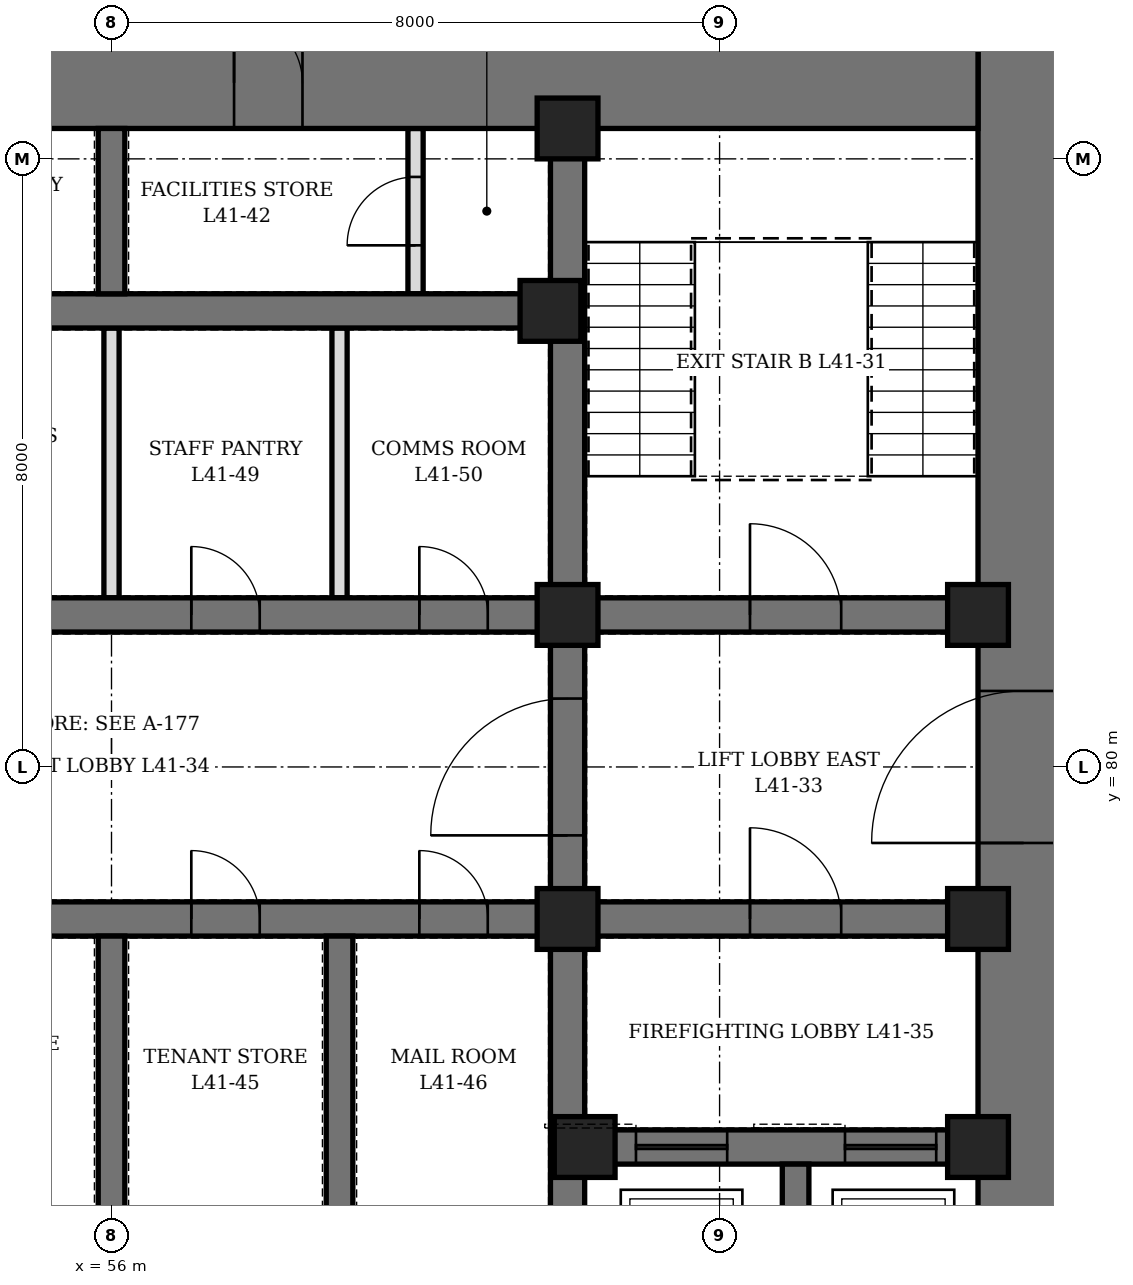
"""IFC4 building model, lengths in metres.
Left out: names, types, materials, properties, quantities, classifications, styles, units other than length and angle.
Written with IfcOpenShell. Run it as: python <this file> out.ifc"""

import sys

from ifc_helpers import new_model, si_unit, direction, frame, frame_2d, origin, origin_2d, place, context, subcontext, project, spatial, rectangle, hollow_rectangle, extrude, element, fill, save


model = new_model("IFC4")
c1 = context("Model", 3, precision=1e-05, world=origin(), true_north=direction((0.0, 1.0)))
c2 = subcontext(c1, "Body", "Model", "MODEL_VIEW")
j1 = project(units=[si_unit("LENGTHUNIT", "METRE"), si_unit("PLANEANGLEUNIT", "RADIAN")], contexts=[c1])
p1 = place(None, origin())
s1 = spatial("IfcSite", under=j1, at=p1, CompositionType="ELEMENT")
p2 = place(p1, origin())
s2 = spatial("IfcBuilding", under=s1, at=p2, CompositionType="ELEMENT")
p3 = place(p2, frame((0.0, 0.0, 185.5)))
s3 = spatial("IfcBuildingStorey", under=s2, at=p3, CompositionType="ELEMENT", Elevation=185.5)
p4 = place(p3, frame((68.0, 70.4, 0.0), z_axis=(0.0, 0.0, 1.0), x_axis=(0.0, 1.0, 0.0)))
e1 = element("IfcWall", 1, at=p4, inside=s3, PredefinedType="SHEAR", context=c2, shape_type="SweptSolid", body=[
    extrude(rectangle(XDim=19.2, YDim=1.2, at=frame_2d((9.6, 0.0))), origin(), (0.0, 0.0, 1.0), 4.2),
])
p5 = place(p4, frame((8.6, 0.0, 0.0)))
e2 = element("IfcOpeningElement", 2, at=p5, cuts=e1, PredefinedType="OPENING", context=c2, shape_type="SweptSolid", body=[
    extrude(rectangle(XDim=2.0, YDim=2.4, at=frame_2d((1.0, 1.2))), frame((0.0, 0.61, 0.0), z_axis=(0.0, -1.0, 0.0), x_axis=(1.0, 0.0, 0.0)), (0.0, 0.0, 1.0), 1.22),
])
p6 = place(p3, frame((44.6, 89.0, 0.0), z_axis=(0.0, 0.0, 1.0), x_axis=(1.0, 0.0, 0.0)))
e3 = element("IfcWall", 3, at=p6, inside=s3, PredefinedType="SHEAR", context=c2, shape_type="SweptSolid", body=[
    extrude(rectangle(XDim=22.8, YDim=1.2, at=frame_2d((11.4, 0.0))), origin(), (0.0, 0.0, 1.0), 4.2),
])
p7 = place(p6, frame((6.525, 0.0, 0.0)))
e4 = element("IfcOpeningElement", 4, at=p7, cuts=e3, PredefinedType="OPENING", context=c2, shape_type="SweptSolid", body=[
    extrude(rectangle(XDim=1.0, YDim=2.1, at=frame_2d((0.5, 1.05))), frame((0.0, 0.61, 0.0), z_axis=(0.0, -1.0, 0.0), x_axis=(1.0, 0.0, 0.0)), (0.0, 0.0, 1.0), 1.22),
])
p8 = place(p6, frame((9.45, 0.0, 0.0)))
e5 = element("IfcOpeningElement", 5, at=p8, cuts=e3, PredefinedType="OPENING", context=c2, shape_type="SweptSolid", body=[
    extrude(rectangle(XDim=0.9, YDim=2.1, at=frame_2d((0.45, 1.05))), frame((0.0, 0.61, 0.0), z_axis=(0.0, -1.0, 0.0), x_axis=(1.0, 0.0, 0.0)), (0.0, 0.0, 1.0), 1.22),
])
p9 = place(p6, frame((13.012, 0.0, 0.0)))
e6 = element("IfcOpeningElement", 6, at=p9, cuts=e3, PredefinedType="OPENING", context=c2, shape_type="SweptSolid", body=[
    extrude(rectangle(XDim=0.9, YDim=2.1, at=frame_2d((0.45, 1.05))), frame((0.0, 0.61, 0.0), z_axis=(0.0, -1.0, 0.0), x_axis=(1.0, 0.0, 0.0)), (0.0, 0.0, 1.0), 1.22),
])
p10 = place(p3, frame((62.0, 71.6, 0.0), z_axis=(0.0, 0.0, 1.0), x_axis=(0.0, 1.0, 0.0)))
e7 = element("IfcWall", 7, at=p10, inside=s3, PredefinedType="SHEAR", context=c2, shape_type="SweptSolid", body=[
    extrude(rectangle(XDim=16.8, YDim=0.45, at=frame_2d((8.4, 0.0))), origin(), (0.0, 0.0, 1.0), 4.2),
])
p11 = place(p10, frame((7.5, 0.0, 0.0)))
e8 = element("IfcOpeningElement", 8, at=p11, cuts=e7, PredefinedType="OPENING", context=c2, shape_type="SweptSolid", body=[
    extrude(rectangle(XDim=1.8, YDim=2.4, at=frame_2d((0.9, 1.2))), frame((0.0, 0.235, 0.0), z_axis=(0.0, -1.0, 0.0), x_axis=(1.0, 0.0, 0.0)), (0.0, 0.0, 1.0), 0.47),
])
p12 = place(p3, frame((62.225, 75.0, 0.0), z_axis=(0.0, 0.0, 1.0), x_axis=(1.0, 0.0, 0.0)))
e9 = element("IfcWall", 9, at=p12, inside=s3, PredefinedType="SHEAR", context=c2, shape_type="SweptSolid", body=[
    extrude(rectangle(XDim=5.175, YDim=0.45, at=frame_2d((2.587, 0.0))), origin(), (0.0, 0.0, 1.0), 4.2),
])
p13 = place(p12, frame((0.675, 0.0, 0.0)))
e10 = element("IfcOpeningElement", 10, at=p13, cuts=e9, PredefinedType="OPENING", context=c2, shape_type="SweptSolid", body=[
    extrude(rectangle(XDim=1.2, YDim=2.2, at=frame_2d((0.6, 1.1))), frame((0.0, 0.235, 0.0), z_axis=(0.0, -1.0, 0.0), x_axis=(1.0, 0.0, 0.0)), (0.0, 0.0, 1.0), 0.47),
])
p14 = place(p12, frame((3.425, 0.0, 0.0)))
e11 = element("IfcOpeningElement", 11, at=p14, cuts=e9, PredefinedType="OPENING", context=c2, shape_type="SweptSolid", body=[
    extrude(rectangle(XDim=1.2, YDim=2.2, at=frame_2d((0.6, 1.1))), frame((0.0, 0.235, 0.0), z_axis=(0.0, -1.0, 0.0), x_axis=(1.0, 0.0, 0.0)), (0.0, 0.0, 1.0), 0.47),
])
p15 = place(p3, frame((62.225, 78.0, 0.0), z_axis=(0.0, 0.0, 1.0), x_axis=(1.0, 0.0, 0.0)))
e12 = element("IfcWall", 12, at=p15, inside=s3, PredefinedType="SHEAR", context=c2, shape_type="SweptSolid", body=[
    extrude(rectangle(XDim=5.175, YDim=0.45, at=frame_2d((2.587, 0.0))), origin(), (0.0, 0.0, 1.0), 4.2),
])
p16 = place(p15, frame((2.175, 0.0, 0.0)))
e13 = element("IfcOpeningElement", 13, at=p16, cuts=e12, PredefinedType="OPENING", context=c2, shape_type="SweptSolid", body=[
    extrude(rectangle(XDim=1.2, YDim=2.1, at=frame_2d((0.6, 1.05))), frame((0.0, 0.235, 0.0), z_axis=(0.0, -1.0, 0.0), x_axis=(1.0, 0.0, 0.0)), (0.0, 0.0, 1.0), 0.47),
])
p17 = place(p3, frame((62.225, 82.0, 0.0), z_axis=(0.0, 0.0, 1.0), x_axis=(1.0, 0.0, 0.0)))
e14 = element("IfcWall", 14, at=p17, inside=s3, PredefinedType="SHEAR", context=c2, shape_type="SweptSolid", body=[
    extrude(rectangle(XDim=5.175, YDim=0.45, at=frame_2d((2.587, 0.0))), origin(), (0.0, 0.0, 1.0), 4.2),
])
p18 = place(p17, frame((2.175, 0.0, 0.0)))
e15 = element("IfcOpeningElement", 15, at=p18, cuts=e14, PredefinedType="OPENING", context=c2, shape_type="SweptSolid", body=[
    extrude(rectangle(XDim=1.2, YDim=2.1, at=frame_2d((0.6, 1.05))), frame((0.0, 0.235, 0.0), z_axis=(0.0, -1.0, 0.0), x_axis=(1.0, 0.0, 0.0)), (0.0, 0.0, 1.0), 0.47),
])
p19 = place(p3, frame((50.225, 78.0, 0.0), z_axis=(0.0, 0.0, 1.0), x_axis=(1.0, 0.0, 0.0)))
e16 = element("IfcWall", 16, at=p19, inside=s3, PredefinedType="SHEAR", context=c2, shape_type="SweptSolid", body=[
    extrude(rectangle(XDim=11.55, YDim=0.45, at=frame_2d((5.775, 0.0))), origin(), (0.0, 0.0, 1.0), 4.2),
])
p20 = place(p19, frame((0.825, 0.0, 0.0)))
e17 = element("IfcOpeningElement", 17, at=p20, cuts=e16, PredefinedType="OPENING", context=c2, shape_type="SweptSolid", body=[
    extrude(rectangle(XDim=0.9, YDim=2.1, at=frame_2d((0.45, 1.05))), frame((0.0, 0.235, 0.0), z_axis=(0.0, -1.0, 0.0), x_axis=(1.0, 0.0, 0.0)), (0.0, 0.0, 1.0), 0.47),
])
p21 = place(p19, frame((3.825, 0.0, 0.0)))
e18 = element("IfcOpeningElement", 18, at=p21, cuts=e16, PredefinedType="OPENING", context=c2, shape_type="SweptSolid", body=[
    extrude(rectangle(XDim=0.9, YDim=2.1, at=frame_2d((0.45, 1.05))), frame((0.0, 0.235, 0.0), z_axis=(0.0, -1.0, 0.0), x_axis=(1.0, 0.0, 0.0)), (0.0, 0.0, 1.0), 0.47),
])
p22 = place(p19, frame((6.825, 0.0, 0.0)))
e19 = element("IfcOpeningElement", 19, at=p22, cuts=e16, PredefinedType="OPENING", context=c2, shape_type="SweptSolid", body=[
    extrude(rectangle(XDim=0.9, YDim=2.1, at=frame_2d((0.45, 1.05))), frame((0.0, 0.235, 0.0), z_axis=(0.0, -1.0, 0.0), x_axis=(1.0, 0.0, 0.0)), (0.0, 0.0, 1.0), 0.47),
])
p23 = place(p19, frame((9.825, 0.0, 0.0)))
e20 = element("IfcOpeningElement", 20, at=p23, cuts=e16, PredefinedType="OPENING", context=c2, shape_type="SweptSolid", body=[
    extrude(rectangle(XDim=0.9, YDim=2.1, at=frame_2d((0.45, 1.05))), frame((0.0, 0.235, 0.0), z_axis=(0.0, -1.0, 0.0), x_axis=(1.0, 0.0, 0.0)), (0.0, 0.0, 1.0), 0.47),
])
p24 = place(p3, frame((50.225, 82.0, 0.0), z_axis=(0.0, 0.0, 1.0), x_axis=(1.0, 0.0, 0.0)))
e21 = element("IfcWall", 21, at=p24, inside=s3, PredefinedType="SHEAR", context=c2, shape_type="SweptSolid", body=[
    extrude(rectangle(XDim=11.55, YDim=0.45, at=frame_2d((5.775, 0.0))), origin(), (0.0, 0.0, 1.0), 4.2),
])
p25 = place(p24, frame((0.825, 0.0, 0.0)))
e22 = element("IfcOpeningElement", 22, at=p25, cuts=e21, PredefinedType="OPENING", context=c2, shape_type="SweptSolid", body=[
    extrude(rectangle(XDim=0.9, YDim=2.1, at=frame_2d((0.45, 1.05))), frame((0.0, 0.235, 0.0), z_axis=(0.0, -1.0, 0.0), x_axis=(1.0, 0.0, 0.0)), (0.0, 0.0, 1.0), 0.47),
])
p26 = place(p24, frame((3.825, 0.0, 0.0)))
e23 = element("IfcOpeningElement", 23, at=p26, cuts=e21, PredefinedType="OPENING", context=c2, shape_type="SweptSolid", body=[
    extrude(rectangle(XDim=0.9, YDim=2.1, at=frame_2d((0.45, 1.05))), frame((0.0, 0.235, 0.0), z_axis=(0.0, -1.0, 0.0), x_axis=(1.0, 0.0, 0.0)), (0.0, 0.0, 1.0), 0.47),
])
p27 = place(p24, frame((6.825, 0.0, 0.0)))
e24 = element("IfcOpeningElement", 24, at=p27, cuts=e21, PredefinedType="OPENING", context=c2, shape_type="SweptSolid", body=[
    extrude(rectangle(XDim=0.9, YDim=2.1, at=frame_2d((0.45, 1.05))), frame((0.0, 0.235, 0.0), z_axis=(0.0, -1.0, 0.0), x_axis=(1.0, 0.0, 0.0)), (0.0, 0.0, 1.0), 0.47),
])
p28 = place(p24, frame((9.825, 0.0, 0.0)))
e25 = element("IfcOpeningElement", 25, at=p28, cuts=e21, PredefinedType="OPENING", context=c2, shape_type="SweptSolid", body=[
    extrude(rectangle(XDim=0.9, YDim=2.1, at=frame_2d((0.45, 1.05))), frame((0.0, 0.235, 0.0), z_axis=(0.0, -1.0, 0.0), x_axis=(1.0, 0.0, 0.0)), (0.0, 0.0, 1.0), 0.47),
])
p29 = place(p3, frame((50.225, 86.0, 0.0), z_axis=(0.0, 0.0, 1.0), x_axis=(1.0, 0.0, 0.0)))
e26 = element("IfcWall", 26, at=p29, inside=s3, PredefinedType="SHEAR", context=c2, shape_type="SweptSolid", body=[
    extrude(rectangle(XDim=11.55, YDim=0.45, at=frame_2d((5.775, 0.0))), origin(), (0.0, 0.0, 1.0), 4.2),
])
for number, where, z_axis, x_axis in (
    (27, (56.0, 74.175, 0.0), (0.0, 0.0, 1.0), (0.0, 1.0, 0.0)),
    (28, (59.0, 74.175, 0.0), (0.0, 0.0, 1.0), (0.0, 1.0, 0.0)),
):
    element("IfcWall", number, at=place(p3, frame(where, z_axis=z_axis, x_axis=x_axis)), inside=s3, PredefinedType="SHEAR", context=c2, shape_type="SweptSolid", body=[
        extrude(rectangle(XDim=3.6, YDim=0.35, at=frame_2d((1.8, 0.0))), origin(), (0.0, 0.0, 1.0), 4.2),
    ])
p30 = place(p3, frame((65.0, 71.6, 0.0), z_axis=(0.0, 0.0, 1.0), x_axis=(0.0, 1.0, 0.0)))
e29 = element("IfcWall", 29, at=p30, inside=s3, PredefinedType="SHEAR", context=c2, shape_type="SweptSolid", body=[
    extrude(rectangle(XDim=3.175, YDim=0.35, at=frame_2d((1.587, 0.0))), origin(), (0.0, 0.0, 1.0), 4.2),
])
p31 = place(p3, frame((56.0, 86.225, 0.0), z_axis=(0.0, 0.0, 1.0), x_axis=(0.0, 1.0, 0.0)))
e30 = element("IfcWall", 30, at=p31, inside=s3, PredefinedType="SHEAR", context=c2, shape_type="SweptSolid", body=[
    extrude(rectangle(XDim=2.175, YDim=0.35, at=frame_2d((1.087, 0.0))), origin(), (0.0, 0.0, 1.0), 4.2),
])
for number, where, z_axis, x_axis in (
    (31, (61.775, 86.0, 0.0), (0.0, 0.0, 1.0), (1.0, 0.0, 0.0)),
    (32, (62.0, 78.0, 0.0), (0.0, 0.0, 1.0), (1.0, 0.0, 0.0)),
    (33, (62.0, 82.0, 0.0), (0.0, 0.0, 1.0), (1.0, 0.0, 0.0)),
    (34, (62.0, 88.4, 0.0), (0.0, 0.0, 1.0), (1.0, 0.0, 0.0)),
    (35, (62.225, 75.0, 0.0), (0.0, 0.0, 1.0), (1.0, 0.0, 0.0)),
    (36, (67.4, 75.0, 0.0), (0.0, 0.0, 1.0), (1.0, 0.0, 0.0)),
    (37, (67.4, 78.0, 0.0), (0.0, 0.0, 1.0), (1.0, 0.0, 0.0)),
    (38, (67.4, 82.0, 0.0), (0.0, 0.0, 1.0), (1.0, 0.0, 0.0)),
):
    element("IfcColumn", number, at=place(p3, frame(where, z_axis=z_axis, x_axis=x_axis)), inside=s3, PredefinedType="COLUMN", context=c2, shape_type="SweptSolid", body=[
        extrude(hollow_rectangle(XDim=0.8, YDim=0.8, WallThickness=0.1, at=origin_2d()), origin(), (0.0, 0.0, 1.0), 4.2),
    ])
p32 = place(p3, frame((60.0, 86.225, 0.0), z_axis=(0.0, 0.0, 1.0), x_axis=(0.0, 1.0, 0.0)))
e39 = element("IfcWall", 39, at=p32, inside=s3, PredefinedType="PARTITIONING", context=c2, shape_type="SweptSolid", body=[
    extrude(rectangle(XDim=2.175, YDim=0.2, at=frame_2d((1.087, 0.0))), origin(), (0.0, 0.0, 1.0), 4.04),
])
p33 = place(p32, frame((0.637, 0.0, 0.0)))
e40 = element("IfcOpeningElement", 40, at=p33, cuts=e39, PredefinedType="OPENING", context=c2, shape_type="SweptSolid", body=[
    extrude(rectangle(XDim=0.9, YDim=2.1, at=frame_2d((0.45, 1.05))), frame((0.0, 0.11, 0.0), z_axis=(0.0, -1.0, 0.0), x_axis=(1.0, 0.0, 0.0)), (0.0, 0.0, 1.0), 0.22),
])
p34 = place(p3, frame((56.0, 82.225, 0.0), z_axis=(0.0, 0.0, 1.0), x_axis=(0.0, 1.0, 0.0)))
e41 = element("IfcWall", 41, at=p34, inside=s3, PredefinedType="PARTITIONING", context=c2, shape_type="SweptSolid", body=[
    extrude(rectangle(XDim=3.55, YDim=0.2, at=frame_2d((1.775, 0.0))), origin(), (0.0, 0.0, 1.0), 2.54),
])
p35 = place(p3, frame((59.0, 82.225, 0.0), z_axis=(0.0, 0.0, 1.0), x_axis=(0.0, 1.0, 0.0)))
e42 = element("IfcWall", 42, at=p35, inside=s3, PredefinedType="PARTITIONING", context=c2, shape_type="SweptSolid", body=[
    extrude(rectangle(XDim=3.55, YDim=0.2, at=frame_2d((1.775, 0.0))), origin(), (0.0, 0.0, 1.0), 4.04),
])
p36 = place(p9, origin())
e43 = element("IfcDoor", 43, at=p36, inside=s3, OperationType="SINGLE_SWING_LEFT", PredefinedType="DOOR", context=c2, shape_type="SweptSolid", body=[
    extrude(rectangle(XDim=0.9, YDim=2.1, at=frame_2d((0.45, 1.05))), frame((0.0, 0.35, 0.0), z_axis=(0.0, -1.0, 0.0), x_axis=(1.0, 0.0, 0.0)), (0.0, 0.0, 1.0), 0.7),
])
fill(e6, e43)
p37 = place(p33, origin())
e44 = element("IfcDoor", 44, at=p37, inside=s3, OperationType="SINGLE_SWING_LEFT", PredefinedType="DOOR", context=c2, shape_type="SweptSolid", body=[
    extrude(rectangle(XDim=0.9, YDim=2.1, at=frame_2d((0.45, 1.05))), frame((0.0, 0.1, 0.0), z_axis=(0.0, -1.0, 0.0), x_axis=(1.0, 0.0, 0.0)), (0.0, 0.0, 1.0), 0.199),
])
fill(e40, e44)
p38 = place(p22, origin())
e45 = element("IfcDoor", 45, at=p38, inside=s3, OperationType="SINGLE_SWING_LEFT", PredefinedType="DOOR", context=c2, shape_type="SweptSolid", body=[
    extrude(rectangle(XDim=0.9, YDim=2.1, at=frame_2d((0.45, 1.05))), frame((0.0, 0.225, 0.0), z_axis=(0.0, -1.0, 0.0), x_axis=(1.0, 0.0, 0.0)), (0.0, 0.0, 1.0), 0.449),
])
fill(e19, e45)
p39 = place(p23, origin())
e46 = element("IfcDoor", 46, at=p39, inside=s3, OperationType="SINGLE_SWING_LEFT", PredefinedType="DOOR", context=c2, shape_type="SweptSolid", body=[
    extrude(rectangle(XDim=0.9, YDim=2.1, at=frame_2d((0.45, 1.05))), frame((0.0, 0.225, 0.0), z_axis=(0.0, -1.0, 0.0), x_axis=(1.0, 0.0, 0.0)), (0.0, 0.0, 1.0), 0.449),
])
fill(e20, e46)
p40 = place(p27, origin())
e47 = element("IfcDoor", 47, at=p40, inside=s3, OperationType="SINGLE_SWING_LEFT", PredefinedType="DOOR", context=c2, shape_type="SweptSolid", body=[
    extrude(rectangle(XDim=0.9, YDim=2.1, at=frame_2d((0.45, 1.05))), frame((0.0, 0.225, 0.0), z_axis=(0.0, -1.0, 0.0), x_axis=(1.0, 0.0, 0.0)), (0.0, 0.0, 1.0), 0.449),
])
fill(e24, e47)
p41 = place(p28, origin())
e48 = element("IfcDoor", 48, at=p41, inside=s3, OperationType="SINGLE_SWING_LEFT", PredefinedType="DOOR", context=c2, shape_type="SweptSolid", body=[
    extrude(rectangle(XDim=0.9, YDim=2.1, at=frame_2d((0.45, 1.05))), frame((0.0, 0.225, 0.0), z_axis=(0.0, -1.0, 0.0), x_axis=(1.0, 0.0, 0.0)), (0.0, 0.0, 1.0), 0.449),
])
fill(e25, e48)
p42 = place(p18, origin())
e49 = element("IfcDoor", 49, at=p42, inside=s3, OperationType="SINGLE_SWING_LEFT", PredefinedType="DOOR", context=c2, shape_type="SweptSolid", body=[
    extrude(rectangle(XDim=1.2, YDim=2.1, at=frame_2d((0.6, 1.05))), frame((0.0, 0.225, 0.0), z_axis=(0.0, -1.0, 0.0), x_axis=(1.0, 0.0, 0.0)), (0.0, 0.0, 1.0), 0.449),
])
fill(e15, e49)
p43 = place(p5, origin())
e50 = element("IfcDoor", 50, at=p43, inside=s3, OperationType="DOUBLE_DOOR_SINGLE_SWING", PredefinedType="DOOR", context=c2, shape_type="SweptSolid", body=[
    extrude(rectangle(XDim=2.0, YDim=2.4, at=frame_2d((1.0, 1.2))), frame((0.0, 0.35, 0.0), z_axis=(0.0, -1.0, 0.0), x_axis=(1.0, 0.0, 0.0)), (0.0, 0.0, 1.0), 0.7),
])
fill(e2, e50)
p44 = place(p11, origin())
e51 = element("IfcDoor", 51, at=p44, inside=s3, OperationType="DOUBLE_DOOR_SINGLE_SWING", PredefinedType="DOOR", context=c2, shape_type="SweptSolid", body=[
    extrude(rectangle(XDim=1.8, YDim=2.4, at=frame_2d((0.9, 1.2))), frame((0.0, 0.225, 0.0), z_axis=(0.0, -1.0, 0.0), x_axis=(1.0, 0.0, 0.0)), (0.0, 0.0, 1.0), 0.449),
])
fill(e8, e51)
p45 = place(p16, origin())
e52 = element("IfcDoor", 52, at=p45, inside=s3, OperationType="SINGLE_SWING_RIGHT", PredefinedType="DOOR", context=c2, shape_type="SweptSolid", body=[
    extrude(rectangle(XDim=1.2, YDim=2.1, at=frame_2d((0.6, 1.05))), frame((0.0, 0.225, 0.0), z_axis=(0.0, -1.0, 0.0), x_axis=(1.0, 0.0, 0.0)), (0.0, 0.0, 1.0), 0.449),
])
fill(e13, e52)
p46 = place(p13, origin())
e53 = element("IfcDoor", 53, at=p46, inside=s3, OperationType="SLIDING_TO_LEFT", PredefinedType="DOOR", context=c2, shape_type="SweptSolid", body=[
    extrude(rectangle(XDim=1.2, YDim=2.2, at=frame_2d((0.6, 1.1))), frame((0.0, 0.225, 0.0), z_axis=(0.0, -1.0, 0.0), x_axis=(1.0, 0.0, 0.0)), (0.0, 0.0, 1.0), 0.449),
])
fill(e10, e53)
p47 = place(p14, origin())
e54 = element("IfcDoor", 54, at=p47, inside=s3, OperationType="SLIDING_TO_LEFT", PredefinedType="DOOR", context=c2, shape_type="SweptSolid", body=[
    extrude(rectangle(XDim=1.2, YDim=2.2, at=frame_2d((0.6, 1.1))), frame((0.0, 0.225, 0.0), z_axis=(0.0, -1.0, 0.0), x_axis=(1.0, 0.0, 0.0)), (0.0, 0.0, 1.0), 0.449),
])
fill(e11, e54)
save(model, sys.argv[1])
